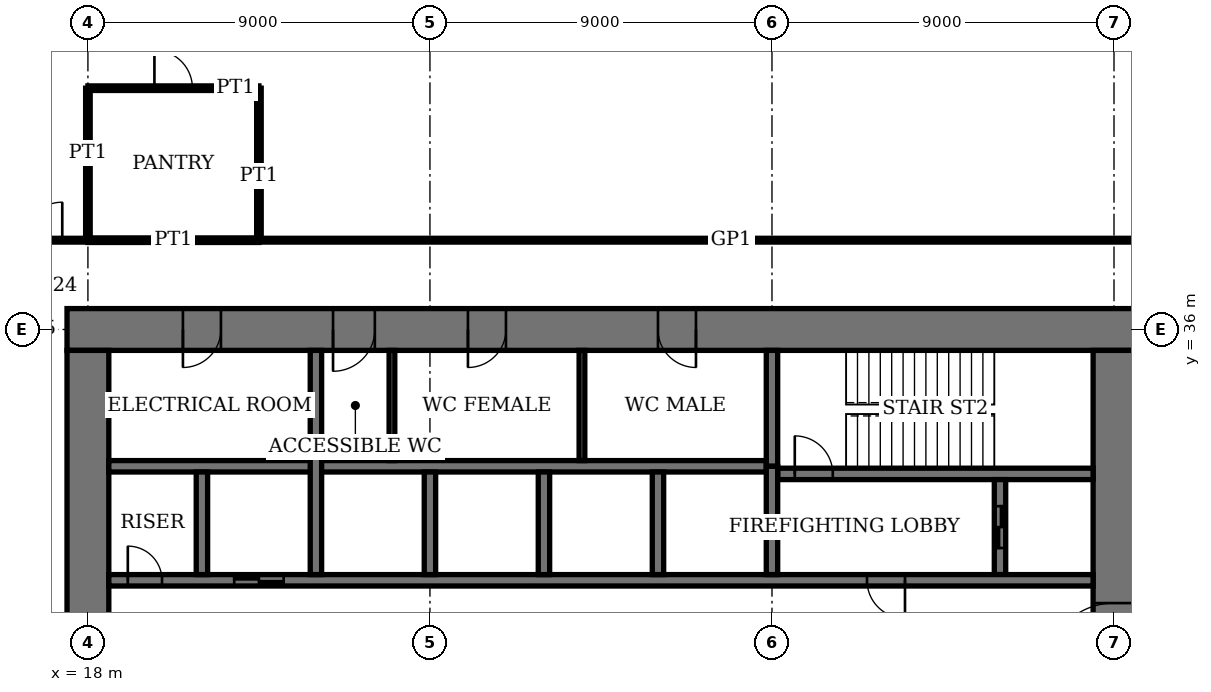
"""IFC4 building model, lengths in metres.
Left out: names, types, materials, properties, quantities, classifications, styles, units other than length and angle.
Written with IfcOpenShell. Run it as: python <this file> out.ifc"""

import sys

from ifc_helpers import new_model, si_unit, direction, frame, frame_2d, origin, place, context, subcontext, project, spatial, rectangle, extrude, element, fill, save


model = new_model("IFC4")
c1 = context("Model", 3, precision=1e-05, world=origin(), true_north=direction((0.0, 1.0)))
c2 = subcontext(c1, "Body", "Model", "MODEL_VIEW")
j1 = project(units=[si_unit("LENGTHUNIT", "METRE"), si_unit("PLANEANGLEUNIT", "RADIAN")], contexts=[c1])
p1 = place(None, origin())
s1 = spatial("IfcSite", under=j1, at=p1, CompositionType="ELEMENT")
p2 = place(p1, origin())
s2 = spatial("IfcBuilding", under=s1, at=p2, CompositionType="ELEMENT")
p3 = place(p2, frame((0.0, 0.0, 51.8)))
s3 = spatial("IfcBuildingStorey", under=s2, at=p3, CompositionType="ELEMENT", Elevation=51.8)
p4 = place(p3, frame((45.55, 36.0, 0.0), z_axis=(0.0, 0.0, 1.0), x_axis=(-1.0, 0.0, 0.0)))
e1 = element("IfcWall", 1, at=p4, inside=s3, PredefinedType="SHEAR", context=c2, shape_type="SweptSolid", body=[
    extrude(rectangle(XDim=28.1, YDim=1.1, at=frame_2d((14.05, 0.0))), origin(), (0.0, 0.0, 1.0), 4.0),
])
p5 = place(p4, frame((11.55, 0.0, 0.0)))
e2 = element("IfcOpeningElement", 2, at=p5, cuts=e1, PredefinedType="OPENING", context=c2, shape_type="SweptSolid", body=[
    extrude(rectangle(XDim=1.0, YDim=2.4, at=frame_2d((0.5, 1.2))), frame((0.0, 0.56, 0.0), z_axis=(0.0, -1.0, 0.0), x_axis=(1.0, 0.0, 0.0)), (0.0, 0.0, 1.0), 1.12),
])
p6 = place(p4, frame((16.55, 0.0, 0.0)))
e3 = element("IfcOpeningElement", 3, at=p6, cuts=e1, PredefinedType="OPENING", context=c2, shape_type="SweptSolid", body=[
    extrude(rectangle(XDim=1.0, YDim=2.4, at=frame_2d((0.5, 1.2))), frame((0.0, 0.56, 0.0), z_axis=(0.0, -1.0, 0.0), x_axis=(1.0, 0.0, 0.0)), (0.0, 0.0, 1.0), 1.12),
])
p7 = place(p4, frame((20.0, 0.0, 0.0)))
e4 = element("IfcOpeningElement", 4, at=p7, cuts=e1, PredefinedType="OPENING", context=c2, shape_type="SweptSolid", body=[
    extrude(rectangle(XDim=1.1, YDim=2.4, at=frame_2d((0.55, 1.2))), frame((0.0, 0.56, 0.0), z_axis=(0.0, -1.0, 0.0), x_axis=(1.0, 0.0, 0.0)), (0.0, 0.0, 1.0), 1.12),
])
p8 = place(p4, frame((24.05, 0.0, 0.0)))
e5 = element("IfcOpeningElement", 5, at=p8, cuts=e1, PredefinedType="OPENING", context=c2, shape_type="SweptSolid", body=[
    extrude(rectangle(XDim=1.0, YDim=2.4, at=frame_2d((0.5, 1.2))), frame((0.0, 0.56, 0.0), z_axis=(0.0, -1.0, 0.0), x_axis=(1.0, 0.0, 0.0)), (0.0, 0.0, 1.0), 1.12),
])
p9 = place(p3, frame((18.0, 35.45, 0.0), z_axis=(0.0, 0.0, 1.0), x_axis=(0.0, -1.0, 0.0)))
e6 = element("IfcWall", 6, at=p9, inside=s3, PredefinedType="SHEAR", context=c2, shape_type="SweptSolid", body=[
    extrude(rectangle(XDim=16.9, YDim=1.1, at=frame_2d((8.45, 0.0))), origin(), (0.0, 0.0, 1.0), 4.0),
])
p10 = place(p9, frame((8.45, 0.0, 0.0)))
e7 = element("IfcOpeningElement", 7, at=p10, cuts=e6, PredefinedType="OPENING", context=c2, shape_type="SweptSolid", body=[
    extrude(rectangle(XDim=1.8, YDim=2.4, at=frame_2d((0.9, 1.2))), frame((0.0, 0.56, 0.0), z_axis=(0.0, -1.0, 0.0), x_axis=(1.0, 0.0, 0.0)), (0.0, 0.0, 1.0), 1.12),
])
p11 = place(p3, frame((45.0, 18.55, 0.0), z_axis=(0.0, 0.0, 1.0), x_axis=(0.0, 1.0, 0.0)))
e8 = element("IfcWall", 8, at=p11, inside=s3, PredefinedType="SHEAR", context=c2, shape_type="SweptSolid", body=[
    extrude(rectangle(XDim=16.9, YDim=1.1, at=frame_2d((8.45, 0.0))), origin(), (0.0, 0.0, 1.0), 4.0),
])
p12 = place(p11, frame((8.45, 0.0, 0.0)))
e9 = element("IfcOpeningElement", 9, at=p12, cuts=e8, PredefinedType="OPENING", context=c2, shape_type="SweptSolid", body=[
    extrude(rectangle(XDim=1.8, YDim=2.4, at=frame_2d((0.9, 1.2))), frame((0.0, 0.56, 0.0), z_axis=(0.0, -1.0, 0.0), x_axis=(1.0, 0.0, 0.0)), (0.0, 0.0, 1.0), 1.12),
])
p13 = place(p3, frame((36.15, 32.2, 0.0), z_axis=(0.0, 0.0, 1.0), x_axis=(1.0, 0.0, 0.0)))
e10 = element("IfcWall", 10, at=p13, inside=s3, PredefinedType="SHEAR", context=c2, shape_type="SweptSolid", body=[
    extrude(rectangle(XDim=8.3, YDim=0.3, at=frame_2d((4.15, 0.0))), origin(), (0.0, 0.0, 1.0), 4.0),
])
p14 = place(p13, frame((0.45, 0.0, 0.0)))
e11 = element("IfcOpeningElement", 11, at=p14, cuts=e10, PredefinedType="OPENING", context=c2, shape_type="SweptSolid", body=[
    extrude(rectangle(XDim=1.0, YDim=2.4, at=frame_2d((0.5, 1.2))), frame((0.0, 0.16, 0.0), z_axis=(0.0, -1.0, 0.0), x_axis=(1.0, 0.0, 0.0)), (0.0, 0.0, 1.0), 0.32),
])
p15 = place(p3, frame((36.0, 32.4, 0.0), z_axis=(0.0, 0.0, 1.0), x_axis=(0.0, 1.0, 0.0)))
e12 = element("IfcWall", 12, at=p15, inside=s3, PredefinedType="SHEAR", context=c2, shape_type="SweptSolid", body=[
    extrude(rectangle(XDim=3.05, YDim=0.3, at=frame_2d((1.525, 0.0))), origin(), (0.0, 0.0, 1.0), 4.0),
])
p16 = place(p3, frame((42.0, 29.55, 0.0), z_axis=(0.0, 0.0, 1.0), x_axis=(0.0, 1.0, 0.0)))
e13 = element("IfcWall", 13, at=p16, inside=s3, PredefinedType="SHEAR", context=c2, shape_type="SweptSolid", body=[
    extrude(rectangle(XDim=2.5, YDim=0.3, at=frame_2d((1.25, 0.0))), origin(), (0.0, 0.0, 1.0), 4.0),
])
p17 = place(p16, frame((0.7, 0.0, 0.0)))
e14 = element("IfcOpeningElement", 14, at=p17, cuts=e13, PredefinedType="OPENING", context=c2, shape_type="SweptSolid", body=[
    extrude(rectangle(XDim=1.1, YDim=2.4, at=frame_2d((0.55, 1.2))), frame((0.0, 0.16, 0.0), z_axis=(0.0, -1.0, 0.0), x_axis=(1.0, 0.0, 0.0)), (0.0, 0.0, 1.0), 0.32),
])
p18 = place(p3, frame((18.55, 29.4, 0.0), z_axis=(0.0, 0.0, 1.0), x_axis=(1.0, 0.0, 0.0)))
e15 = element("IfcWall", 15, at=p18, inside=s3, PredefinedType="SHEAR", context=c2, shape_type="SweptSolid", body=[
    extrude(rectangle(XDim=25.9, YDim=0.3, at=frame_2d((12.95, 0.0))), origin(), (0.0, 0.0, 1.0), 4.0),
])
p19 = place(p18, frame((19.95, 0.0, 0.0)))
e16 = element("IfcOpeningElement", 16, at=p19, cuts=e15, PredefinedType="OPENING", context=c2, shape_type="SweptSolid", body=[
    extrude(rectangle(XDim=1.0, YDim=2.4, at=frame_2d((0.5, 1.2))), frame((0.0, 0.16, 0.0), z_axis=(0.0, -1.0, 0.0), x_axis=(1.0, 0.0, 0.0)), (0.0, 0.0, 1.0), 0.32),
])
p20 = place(p18, frame((0.5, 0.0, 0.0)))
e17 = element("IfcOpeningElement", 17, at=p20, cuts=e15, PredefinedType="OPENING", context=c2, shape_type="SweptSolid", body=[
    extrude(rectangle(XDim=0.9, YDim=2.1, at=frame_2d((0.45, 1.05))), frame((0.0, 0.16, 0.0), z_axis=(0.0, -1.0, 0.0), x_axis=(1.0, 0.0, 0.0)), (0.0, 0.0, 1.0), 0.32),
])
p21 = place(p18, frame((3.3, 0.0, 0.0)))
e18 = element("IfcOpeningElement", 18, at=p21, cuts=e15, PredefinedType="OPENING", context=c2, shape_type="SweptSolid", body=[
    extrude(rectangle(XDim=1.3, YDim=2.4, at=frame_2d((0.65, 1.2))), frame((0.0, 0.16, 0.0), z_axis=(0.0, -1.0, 0.0), x_axis=(1.0, 0.0, 0.0)), (0.0, 0.0, 1.0), 0.32),
])
p22 = place(p3, frame((18.55, 32.4, 0.0), z_axis=(0.0, 0.0, 1.0), x_axis=(1.0, 0.0, 0.0)))
e19 = element("IfcWall", 19, at=p22, inside=s3, PredefinedType="SHEAR", context=c2, shape_type="SweptSolid", body=[
    extrude(rectangle(XDim=17.3, YDim=0.3, at=frame_2d((8.65, 0.0))), origin(), (0.0, 0.0, 1.0), 4.0),
])
for number, where, z_axis, x_axis in (
    (20, (33.0, 29.55, 0.0), (0.0, 0.0, 1.0), (0.0, 1.0, 0.0)),
    (21, (30.0, 29.55, 0.0), (0.0, 0.0, 1.0), (0.0, 1.0, 0.0)),
    (22, (27.0, 29.55, 0.0), (0.0, 0.0, 1.0), (0.0, 1.0, 0.0)),
):
    element("IfcWall", number, at=place(p3, frame(where, z_axis=z_axis, x_axis=x_axis)), inside=s3, PredefinedType="SHEAR", context=c2, shape_type="SweptSolid", body=[
        extrude(rectangle(XDim=2.7, YDim=0.3, at=frame_2d((1.35, 0.0))), origin(), (0.0, 0.0, 1.0), 4.0),
    ])
p23 = place(p3, frame((24.0, 29.55, 0.0), z_axis=(0.0, 0.0, 1.0), x_axis=(0.0, 1.0, 0.0)))
e23 = element("IfcWall", 23, at=p23, inside=s3, PredefinedType="SHEAR", context=c2, shape_type="SweptSolid", body=[
    extrude(rectangle(XDim=5.9, YDim=0.3, at=frame_2d((2.95, 0.0))), origin(), (0.0, 0.0, 1.0), 4.0),
])
p24 = place(p3, frame((21.0, 29.55, 0.0), z_axis=(0.0, 0.0, 1.0), x_axis=(0.0, 1.0, 0.0)))
e24 = element("IfcWall", 24, at=p24, inside=s3, PredefinedType="SHEAR", context=c2, shape_type="SweptSolid", body=[
    extrude(rectangle(XDim=2.7, YDim=0.3, at=frame_2d((1.35, 0.0))), origin(), (0.0, 0.0, 1.0), 4.0),
])
p25 = place(p3, frame((36.0, 29.55, 0.0), z_axis=(0.0, 0.0, 1.0), x_axis=(0.0, 1.0, 0.0)))
e25 = element("IfcWall", 25, at=p25, inside=s3, PredefinedType="SHEAR", context=c2, shape_type="SweptSolid", body=[
    extrude(rectangle(XDim=2.85, YDim=0.3, at=frame_2d((1.425, 0.0))), origin(), (0.0, 0.0, 1.0), 4.0),
])
p26 = place(p3, frame((18.0, 38.35, 0.0), z_axis=(0.0, 0.0, 1.0), x_axis=(1.0, 0.0, 0.0)))
e26 = element("IfcWall", 26, at=p26, inside=s3, PredefinedType="PARTITIONING", context=c2, shape_type="SweptSolid", body=[
    extrude(rectangle(XDim=4.5, YDim=0.12, at=frame_2d((2.25, 0.0))), origin(), (0.0, 0.0, 1.0), 3.75),
])
p27 = place(p3, frame((15.65, 38.35, 0.0), z_axis=(0.0, 0.0, 1.0), x_axis=(1.0, 0.0, 0.0)))
e27 = element("IfcWall", 27, at=p27, inside=s3, PredefinedType="PARTITIONING", context=c2, shape_type="SweptSolid", body=[
    extrude(rectangle(XDim=2.35, YDim=0.1, at=frame_2d((1.175, 0.0))), origin(), (0.0, 0.0, 1.0), 3.75),
])
p28 = place(p27, frame((0.675, 0.0, 0.0)))
e28 = element("IfcOpeningElement", 28, at=p28, cuts=e27, PredefinedType="OPENING", context=c2, shape_type="SweptSolid", body=[
    extrude(rectangle(XDim=1.0, YDim=2.4, at=frame_2d((0.5, 1.2))), frame((0.0, 0.06, 0.0), z_axis=(0.0, -1.0, 0.0), x_axis=(1.0, 0.0, 0.0)), (0.0, 0.0, 1.0), 0.12),
])
p29 = place(p3, frame((22.5, 38.35, 0.0), z_axis=(0.0, 0.0, 1.0), x_axis=(1.0, 0.0, 0.0)))
e29 = element("IfcWall", 29, at=p29, inside=s3, PredefinedType="PARTITIONING", context=c2, shape_type="SweptSolid", body=[
    extrude(rectangle(XDim=24.85, YDim=0.1, at=frame_2d((12.425, 0.0))), origin(), (0.0, 0.0, 1.0), 3.75),
])
p30 = place(p3, frame((18.0, 42.35, 0.0), z_axis=(0.0, 0.0, 1.0), x_axis=(1.0, 0.0, 0.0)))
e30 = element("IfcWall", 30, at=p30, inside=s3, PredefinedType="PARTITIONING", context=c2, shape_type="SweptSolid", body=[
    extrude(rectangle(XDim=4.5, YDim=0.12, at=frame_2d((2.25, 0.0))), origin(), (0.0, 0.0, 1.0), 3.75),
])
p31 = place(p30, frame((1.75, 0.0, 0.0)))
e31 = element("IfcOpeningElement", 31, at=p31, cuts=e30, PredefinedType="OPENING", context=c2, shape_type="SweptSolid", body=[
    extrude(rectangle(XDim=1.0, YDim=2.4, at=frame_2d((0.5, 1.2))), frame((0.0, 0.07, 0.0), z_axis=(0.0, -1.0, 0.0), x_axis=(1.0, 0.0, 0.0)), (0.0, 0.0, 1.0), 0.14),
])
p32 = place(p3, frame((18.0, 38.35, 0.0), z_axis=(0.0, 0.0, 1.0), x_axis=(0.0, 1.0, 0.0)))
e32 = element("IfcWall", 32, at=p32, inside=s3, PredefinedType="PARTITIONING", context=c2, shape_type="SweptSolid", body=[
    extrude(rectangle(XDim=4.0, YDim=0.12, at=frame_2d((2.0, 0.0))), origin(), (0.0, 0.0, 1.0), 3.05),
])
p33 = place(p3, frame((22.5, 38.35, 0.0), z_axis=(0.0, 0.0, 1.0), x_axis=(0.0, 1.0, 0.0)))
e33 = element("IfcWall", 33, at=p33, inside=s3, PredefinedType="PARTITIONING", context=c2, shape_type="SweptSolid", body=[
    extrude(rectangle(XDim=4.0, YDim=0.12, at=frame_2d((2.0, 0.0))), origin(), (0.0, 0.0, 1.0), 3.75),
])
for number, where, z_axis, x_axis in (
    (34, (31.0, 32.55, 0.0), (0.0, 0.0, 1.0), (0.0, 1.0, 0.0)),
    (35, (26.0, 32.55, 0.0), (0.0, 0.0, 1.0), (0.0, 1.0, 0.0)),
):
    element("IfcWall", number, at=place(p3, frame(where, z_axis=z_axis, x_axis=x_axis)), inside=s3, PredefinedType="PARTITIONING", context=c2, shape_type="SweptSolid", body=[
        extrude(rectangle(XDim=2.9, YDim=0.15, at=frame_2d((1.45, 0.0))), origin(), (0.0, 0.0, 1.0), 3.75),
    ])
p34 = place(p12, origin())
e36 = element("IfcDoor", 36, at=p34, inside=s3, OperationType="DOUBLE_DOOR_DOUBLE_SWING", PredefinedType="DOOR", context=c2, shape_type="SweptSolid", body=[
    extrude(rectangle(XDim=1.8, YDim=2.4, at=frame_2d((0.9, 1.2))), frame((0.0, 0.03, 0.0), z_axis=(0.0, -1.0, 0.0), x_axis=(1.0, 0.0, 0.0)), (0.0, 0.0, 1.0), 0.06),
    extrude(rectangle(XDim=0.04, YDim=2.4, at=frame_2d((0.02, 1.2))), frame((0.0, 0.55, 0.0), z_axis=(0.0, -1.0, 0.0), x_axis=(1.0, 0.0, 0.0)), (0.0, 0.0, 1.0), 1.1),
    extrude(rectangle(XDim=0.04, YDim=2.4, at=frame_2d((1.78, 1.2))), frame((0.0, 0.55, 0.0), z_axis=(0.0, -1.0, 0.0), x_axis=(1.0, 0.0, 0.0)), (0.0, 0.0, 1.0), 1.1),
    extrude(rectangle(XDim=1.8, YDim=0.04, at=frame_2d((0.9, 2.38))), frame((0.0, 0.55, 0.0), z_axis=(0.0, -1.0, 0.0), x_axis=(1.0, 0.0, 0.0)), (0.0, 0.0, 1.0), 1.1),
])
fill(e9, e36)
p35 = place(p5, origin())
e37 = element("IfcDoor", 37, at=p35, inside=s3, OperationType="SINGLE_SWING_RIGHT", PredefinedType="DOOR", context=c2, shape_type="SweptSolid", body=[
    extrude(rectangle(XDim=1.0, YDim=2.4, at=frame_2d((0.5, 1.2))), frame((0.0, 0.025, 0.0), z_axis=(0.0, -1.0, 0.0), x_axis=(1.0, 0.0, 0.0)), (0.0, 0.0, 1.0), 0.05),
    extrude(rectangle(XDim=0.04, YDim=2.4, at=frame_2d((0.02, 1.2))), frame((0.0, 0.4, 0.0), z_axis=(0.0, -1.0, 0.0), x_axis=(1.0, 0.0, 0.0)), (0.0, 0.0, 1.0), 0.8),
    extrude(rectangle(XDim=0.04, YDim=2.4, at=frame_2d((0.98, 1.2))), frame((0.0, 0.4, 0.0), z_axis=(0.0, -1.0, 0.0), x_axis=(1.0, 0.0, 0.0)), (0.0, 0.0, 1.0), 0.8),
    extrude(rectangle(XDim=1.0, YDim=0.04, at=frame_2d((0.5, 2.38))), frame((0.0, 0.4, 0.0), z_axis=(0.0, -1.0, 0.0), x_axis=(1.0, 0.0, 0.0)), (0.0, 0.0, 1.0), 0.8),
])
fill(e2, e37)
p36 = place(p6, origin())
e38 = element("IfcDoor", 38, at=p36, inside=s3, OperationType="SINGLE_SWING_LEFT", PredefinedType="DOOR", context=c2, shape_type="SweptSolid", body=[
    extrude(rectangle(XDim=1.0, YDim=2.4, at=frame_2d((0.5, 1.2))), frame((0.0, 0.025, 0.0), z_axis=(0.0, -1.0, 0.0), x_axis=(1.0, 0.0, 0.0)), (0.0, 0.0, 1.0), 0.05),
    extrude(rectangle(XDim=0.04, YDim=2.4, at=frame_2d((0.02, 1.2))), frame((0.0, 0.4, 0.0), z_axis=(0.0, -1.0, 0.0), x_axis=(1.0, 0.0, 0.0)), (0.0, 0.0, 1.0), 0.8),
    extrude(rectangle(XDim=0.04, YDim=2.4, at=frame_2d((0.98, 1.2))), frame((0.0, 0.4, 0.0), z_axis=(0.0, -1.0, 0.0), x_axis=(1.0, 0.0, 0.0)), (0.0, 0.0, 1.0), 0.8),
    extrude(rectangle(XDim=1.0, YDim=0.04, at=frame_2d((0.5, 2.38))), frame((0.0, 0.4, 0.0), z_axis=(0.0, -1.0, 0.0), x_axis=(1.0, 0.0, 0.0)), (0.0, 0.0, 1.0), 0.8),
])
fill(e3, e38)
p37 = place(p7, origin())
e39 = element("IfcDoor", 39, at=p37, inside=s3, OperationType="SINGLE_SWING_LEFT", PredefinedType="DOOR", context=c2, shape_type="SweptSolid", body=[
    extrude(rectangle(XDim=1.1, YDim=2.4, at=frame_2d((0.55, 1.2))), frame((0.0, 0.025, 0.0), z_axis=(0.0, -1.0, 0.0), x_axis=(1.0, 0.0, 0.0)), (0.0, 0.0, 1.0), 0.05),
    extrude(rectangle(XDim=0.04, YDim=2.4, at=frame_2d((0.02, 1.2))), frame((0.0, 0.44, 0.0), z_axis=(0.0, -1.0, 0.0), x_axis=(1.0, 0.0, 0.0)), (0.0, 0.0, 1.0), 0.88),
    extrude(rectangle(XDim=0.04, YDim=2.4, at=frame_2d((1.08, 1.2))), frame((0.0, 0.44, 0.0), z_axis=(0.0, -1.0, 0.0), x_axis=(1.0, 0.0, 0.0)), (0.0, 0.0, 1.0), 0.88),
    extrude(rectangle(XDim=1.1, YDim=0.04, at=frame_2d((0.55, 2.38))), frame((0.0, 0.44, 0.0), z_axis=(0.0, -1.0, 0.0), x_axis=(1.0, 0.0, 0.0)), (0.0, 0.0, 1.0), 0.88),
])
fill(e4, e39)
p38 = place(p8, origin())
e40 = element("IfcDoor", 40, at=p38, inside=s3, OperationType="SINGLE_SWING_LEFT", PredefinedType="DOOR", context=c2, shape_type="SweptSolid", body=[
    extrude(rectangle(XDim=1.0, YDim=2.4, at=frame_2d((0.5, 1.2))), frame((0.0, 0.025, 0.0), z_axis=(0.0, -1.0, 0.0), x_axis=(1.0, 0.0, 0.0)), (0.0, 0.0, 1.0), 0.05),
    extrude(rectangle(XDim=0.04, YDim=2.4, at=frame_2d((0.02, 1.2))), frame((0.0, 0.4, 0.0), z_axis=(0.0, -1.0, 0.0), x_axis=(1.0, 0.0, 0.0)), (0.0, 0.0, 1.0), 0.8),
    extrude(rectangle(XDim=0.04, YDim=2.4, at=frame_2d((0.98, 1.2))), frame((0.0, 0.4, 0.0), z_axis=(0.0, -1.0, 0.0), x_axis=(1.0, 0.0, 0.0)), (0.0, 0.0, 1.0), 0.8),
    extrude(rectangle(XDim=1.0, YDim=0.04, at=frame_2d((0.5, 2.38))), frame((0.0, 0.4, 0.0), z_axis=(0.0, -1.0, 0.0), x_axis=(1.0, 0.0, 0.0)), (0.0, 0.0, 1.0), 0.8),
])
fill(e5, e40)
p39 = place(p14, origin())
e41 = element("IfcDoor", 41, at=p39, inside=s3, OperationType="SINGLE_SWING_RIGHT", PredefinedType="DOOR", context=c2, shape_type="SweptSolid", body=[
    extrude(rectangle(XDim=1.0, YDim=2.4, at=frame_2d((0.5, 1.2))), frame((0.0, 0.03, 0.0), z_axis=(0.0, -1.0, 0.0), x_axis=(1.0, 0.0, 0.0)), (0.0, 0.0, 1.0), 0.06),
])
fill(e11, e41)
p40 = place(p19, origin())
e42 = element("IfcDoor", 42, at=p40, inside=s3, OperationType="SINGLE_SWING_RIGHT", PredefinedType="DOOR", context=c2, shape_type="SweptSolid", body=[
    extrude(rectangle(XDim=1.0, YDim=2.4, at=frame_2d((0.5, 1.2))), frame((0.0, 0.03, 0.0), z_axis=(0.0, -1.0, 0.0), x_axis=(1.0, 0.0, 0.0)), (0.0, 0.0, 1.0), 0.06),
])
fill(e16, e42)
p41 = place(p20, origin())
e43 = element("IfcDoor", 43, at=p41, inside=s3, OperationType="SINGLE_SWING_RIGHT", PredefinedType="DOOR", context=c2, shape_type="SweptSolid", body=[
    extrude(rectangle(XDim=0.9, YDim=2.1, at=frame_2d((0.45, 1.05))), frame((0.0, 0.03, 0.0), z_axis=(0.0, -1.0, 0.0), x_axis=(1.0, 0.0, 0.0)), (0.0, 0.0, 1.0), 0.06),
])
fill(e17, e43)
p42 = place(p28, origin())
e44 = element("IfcDoor", 44, at=p42, inside=s3, OperationType="SINGLE_SWING_LEFT", PredefinedType="DOOR", context=c2, shape_type="SweptSolid", body=[
    extrude(rectangle(XDim=1.0, YDim=2.4, at=frame_2d((0.5, 1.2))), frame((0.0, 0.02, 0.0), z_axis=(0.0, -1.0, 0.0), x_axis=(1.0, 0.0, 0.0)), (0.0, 0.0, 1.0), 0.04),
])
fill(e28, e44)
p43 = place(p31, origin())
e45 = element("IfcDoor", 45, at=p43, inside=s3, OperationType="SINGLE_SWING_RIGHT", PredefinedType="DOOR", context=c2, shape_type="SweptSolid", body=[
    extrude(rectangle(XDim=1.0, YDim=2.4, at=frame_2d((0.5, 1.2))), frame((0.0, 0.025, 0.0), z_axis=(0.0, -1.0, 0.0), x_axis=(1.0, 0.0, 0.0)), (0.0, 0.0, 1.0), 0.05),
])
fill(e31, e45)
p44 = place(p21, origin())
e46 = element("IfcDoor", 46, at=p44, inside=s3, OperationType="DOUBLE_DOOR_SLIDING", PredefinedType="DOOR", context=c2, shape_type="SweptSolid", body=[
    extrude(rectangle(XDim=1.3, YDim=2.4, at=frame_2d((0.65, 1.2))), frame((0.0, 0.02, 0.0), z_axis=(0.0, -1.0, 0.0), x_axis=(1.0, 0.0, 0.0)), (0.0, 0.0, 1.0), 0.04),
])
fill(e18, e46)
p45 = place(p17, origin())
e47 = element("IfcDoor", 47, at=p45, inside=s3, OperationType="DOUBLE_DOOR_SLIDING", PredefinedType="DOOR", context=c2, shape_type="SweptSolid", body=[
    extrude(rectangle(XDim=1.1, YDim=2.4, at=frame_2d((0.55, 1.2))), frame((0.0, 0.03, 0.0), z_axis=(0.0, -1.0, 0.0), x_axis=(1.0, 0.0, 0.0)), (0.0, 0.0, 1.0), 0.06),
])
fill(e14, e47)
save(model, sys.argv[1])
